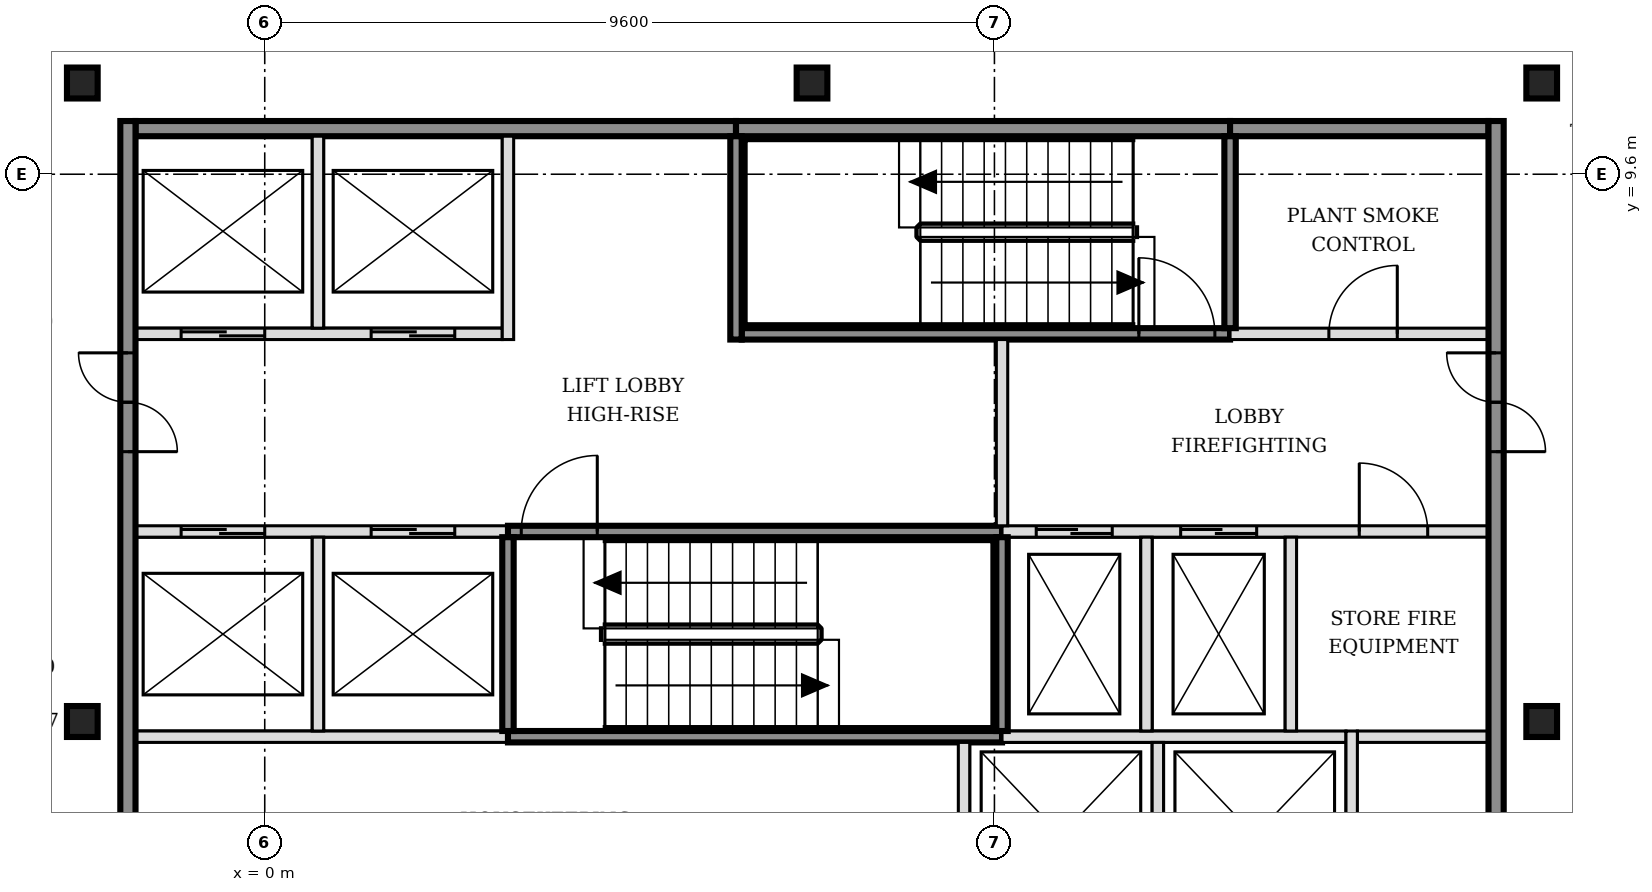
"""IFC4 building model, lengths in metres.
Left out: names, types, materials, properties, quantities, classifications, styles, units other than length and angle.
Written with IfcOpenShell. Run it as: python <this file> out.ifc"""

import sys

from ifc_helpers import new_model, si_unit, direction, frame, frame_2d, origin, origin_2d, place, context, subcontext, project, spatial, rectangle, i_section, extrude, element, fill, save


model = new_model("IFC4")
c1 = context("Model", 3, precision=1e-05, world=origin(), true_north=direction((0.0, 1.0)))
c2 = subcontext(c1, "Body", "Model", "MODEL_VIEW")
j1 = project(units=[si_unit("LENGTHUNIT", "METRE"), si_unit("PLANEANGLEUNIT", "RADIAN")], contexts=[c1])
p1 = place(None, origin())
s1 = spatial("IfcSite", under=j1, at=p1, CompositionType="ELEMENT")
p2 = place(p1, origin())
s2 = spatial("IfcBuilding", under=s1, at=p2, CompositionType="ELEMENT")
p3 = place(p2, frame((0.0, 0.0, 221.4)))
s3 = spatial("IfcBuildingStorey", under=s2, at=p3, CompositionType="ELEMENT", Elevation=221.4)
for number, where, z_axis, x_axis in (
    (1, (-2.4, 2.4, -0.15), (0.0, 0.0, 1.0), (1.0, 0.0, 0.0)),
    (2, (16.8, 2.4, -0.15), (0.0, 0.0, 1.0), (1.0, 0.0, 0.0)),
    (3, (-2.4, 10.8, -0.15), (0.0, 0.0, 1.0), (1.0, 0.0, 0.0)),
    (4, (7.2, 10.8, -0.15), (0.0, 0.0, 1.0), (1.0, 0.0, 0.0)),
    (5, (16.8, 10.8, -0.15), (0.0, 0.0, 1.0), (1.0, 0.0, 0.0)),
):
    element("IfcColumn", number, at=place(p3, frame(where, z_axis=z_axis, x_axis=x_axis)), inside=s3, PredefinedType="COLUMN", context=c2, shape_type="SweptSolid", body=[
        extrude(i_section(OverallWidth=0.404, OverallDepth=0.407, WebThickness=0.027, FlangeThickness=0.044, FilletRadius=0.015, at=origin_2d()), origin(), (0.0, 0.0, 1.0), 3.6),
    ])
p4 = place(p3, frame((-1.7, 2.2, 0.0), z_axis=(0.0, 0.0, 1.0), x_axis=(1.0, 0.0, 0.0)))
e6 = element("IfcWall", 6, at=p4, inside=s3, PredefinedType="SOLIDWALL", context=c2, shape_type="SweptSolid", body=[
    extrude(rectangle(XDim=4.9, YDim=0.15, at=frame_2d((2.45, 0.0))), origin(), (0.0, 0.0, 1.0), 3.45),
])
p5 = place(p3, frame((3.2, 2.2, 0.0), z_axis=(0.0, 0.0, 1.0), x_axis=(1.0, 0.0, 0.0)))
e7 = element("IfcWall", 7, at=p5, inside=s3, PredefinedType="SOLIDWALL", context=c2, shape_type="SweptSolid", body=[
    extrude(rectangle(XDim=6.5, YDim=0.15, at=frame_2d((3.25, 0.0))), origin(), (0.0, 0.0, 1.0), 3.45),
])
p6 = place(p3, frame((9.7, 2.2, 0.0), z_axis=(0.0, 0.0, 1.0), x_axis=(1.0, 0.0, 0.0)))
e8 = element("IfcWall", 8, at=p6, inside=s3, PredefinedType="SOLIDWALL", context=c2, shape_type="SweptSolid", body=[
    extrude(rectangle(XDim=4.525, YDim=0.15, at=frame_2d((2.263, 0.0))), origin(), (0.0, 0.0, 1.0), 3.45),
])
p7 = place(p3, frame((14.375, 2.2, 0.0), z_axis=(0.0, 0.0, 1.0), x_axis=(1.0, 0.0, 0.0)))
e9 = element("IfcWall", 9, at=p7, inside=s3, PredefinedType="PARTITIONING", context=c2, shape_type="SweptSolid", body=[
    extrude(rectangle(XDim=1.725, YDim=0.15, at=frame_2d((0.863, 0.0))), origin(), (0.0, 0.0, 1.0), 3.45),
])
p8 = place(p3, frame((-1.7, 4.9, 0.0), z_axis=(0.0, 0.0, 1.0), x_axis=(1.0, 0.0, 0.0)))
e10 = element("IfcWall", 10, at=p8, inside=s3, PredefinedType="SOLIDWALL", context=c2, shape_type="SweptSolid", body=[
    extrude(rectangle(XDim=4.9, YDim=0.15, at=frame_2d((2.45, 0.0))), origin(), (0.0, 0.0, 1.0), 3.45),
])
p9 = place(p8, frame((0.6, 0.0, 0.0)))
e11 = element("IfcOpeningElement", 11, at=p9, cuts=e10, PredefinedType="OPENING", context=c2, shape_type="SweptSolid", body=[
    extrude(rectangle(XDim=1.1, YDim=2.1, at=frame_2d((0.55, 1.05))), frame((0.0, 0.085, 0.0), z_axis=(0.0, -1.0, 0.0), x_axis=(1.0, 0.0, 0.0)), (0.0, 0.0, 1.0), 0.17),
])
p10 = place(p8, frame((3.1, 0.0, 0.0)))
e12 = element("IfcOpeningElement", 12, at=p10, cuts=e10, PredefinedType="OPENING", context=c2, shape_type="SweptSolid", body=[
    extrude(rectangle(XDim=1.1, YDim=2.1, at=frame_2d((0.55, 1.05))), frame((0.0, 0.085, 0.0), z_axis=(0.0, -1.0, 0.0), x_axis=(1.0, 0.0, 0.0)), (0.0, 0.0, 1.0), 0.17),
])
p11 = place(p3, frame((3.2, 4.9, 0.0), z_axis=(0.0, 0.0, 1.0), x_axis=(1.0, 0.0, 0.0)))
e13 = element("IfcWall", 13, at=p11, inside=s3, PredefinedType="SOLIDWALL", context=c2, shape_type="SweptSolid", body=[
    extrude(rectangle(XDim=6.5, YDim=0.15, at=frame_2d((3.25, 0.0))), origin(), (0.0, 0.0, 1.0), 3.45),
])
p12 = place(p11, frame((0.175, 0.0, 0.0)))
e14 = element("IfcOpeningElement", 14, at=p12, cuts=e13, PredefinedType="OPENING", context=c2, shape_type="SweptSolid", body=[
    extrude(rectangle(XDim=1.0, YDim=2.1, at=frame_2d((0.5, 1.05))), frame((0.0, 0.085, 0.0), z_axis=(0.0, -1.0, 0.0), x_axis=(1.0, 0.0, 0.0)), (0.0, 0.0, 1.0), 0.17),
])
p13 = place(p3, frame((9.7, 4.9, 0.0), z_axis=(0.0, 0.0, 1.0), x_axis=(1.0, 0.0, 0.0)))
e15 = element("IfcWall", 15, at=p13, inside=s3, PredefinedType="SOLIDWALL", context=c2, shape_type="SweptSolid", body=[
    extrude(rectangle(XDim=6.4, YDim=0.15, at=frame_2d((3.2, 0.0))), origin(), (0.0, 0.0, 1.0), 3.45),
])
p14 = place(p13, frame((0.45, 0.0, 0.0)))
e16 = element("IfcOpeningElement", 16, at=p14, cuts=e15, PredefinedType="OPENING", context=c2, shape_type="SweptSolid", body=[
    extrude(rectangle(XDim=1.0, YDim=2.1, at=frame_2d((0.5, 1.05))), frame((0.0, 0.085, 0.0), z_axis=(0.0, -1.0, 0.0), x_axis=(1.0, 0.0, 0.0)), (0.0, 0.0, 1.0), 0.17),
])
p15 = place(p13, frame((2.35, 0.0, 0.0)))
e17 = element("IfcOpeningElement", 17, at=p15, cuts=e15, PredefinedType="OPENING", context=c2, shape_type="SweptSolid", body=[
    extrude(rectangle(XDim=1.0, YDim=2.1, at=frame_2d((0.5, 1.05))), frame((0.0, 0.085, 0.0), z_axis=(0.0, -1.0, 0.0), x_axis=(1.0, 0.0, 0.0)), (0.0, 0.0, 1.0), 0.17),
])
p16 = place(p13, frame((4.7, 0.0, 0.0)))
e18 = element("IfcOpeningElement", 18, at=p16, cuts=e15, PredefinedType="OPENING", context=c2, shape_type="SweptSolid", body=[
    extrude(rectangle(XDim=0.9, YDim=2.1, at=frame_2d((0.45, 1.05))), frame((0.0, 0.085, 0.0), z_axis=(0.0, -1.0, 0.0), x_axis=(1.0, 0.0, 0.0)), (0.0, 0.0, 1.0), 0.17),
])
p17 = place(p3, frame((-1.7, 7.5, 0.0), z_axis=(0.0, 0.0, 1.0), x_axis=(1.0, 0.0, 0.0)))
e19 = element("IfcWall", 19, at=p17, inside=s3, PredefinedType="SOLIDWALL", context=c2, shape_type="SweptSolid", body=[
    extrude(rectangle(XDim=4.825, YDim=0.15, at=frame_2d((2.413, 0.0))), origin(), (0.0, 0.0, 1.0), 3.45),
])
p18 = place(p17, frame((0.6, 0.0, 0.0)))
e20 = element("IfcOpeningElement", 20, at=p18, cuts=e19, PredefinedType="OPENING", context=c2, shape_type="SweptSolid", body=[
    extrude(rectangle(XDim=1.1, YDim=2.1, at=frame_2d((0.55, 1.05))), frame((0.0, 0.085, 0.0), z_axis=(0.0, -1.0, 0.0), x_axis=(1.0, 0.0, 0.0)), (0.0, 0.0, 1.0), 0.17),
])
p19 = place(p17, frame((3.1, 0.0, 0.0)))
e21 = element("IfcOpeningElement", 21, at=p19, cuts=e19, PredefinedType="OPENING", context=c2, shape_type="SweptSolid", body=[
    extrude(rectangle(XDim=1.1, YDim=2.1, at=frame_2d((0.55, 1.05))), frame((0.0, 0.085, 0.0), z_axis=(0.0, -1.0, 0.0), x_axis=(1.0, 0.0, 0.0)), (0.0, 0.0, 1.0), 0.17),
])
p20 = place(p3, frame((6.275, 7.5, 0.0), z_axis=(0.0, 0.0, 1.0), x_axis=(1.0, 0.0, 0.0)))
e22 = element("IfcWall", 22, at=p20, inside=s3, PredefinedType="SOLIDWALL", context=c2, shape_type="SweptSolid", body=[
    extrude(rectangle(XDim=6.425, YDim=0.15, at=frame_2d((3.212, 0.0))), origin(), (0.0, 0.0, 1.0), 3.45),
])
p21 = place(p20, frame((5.225, 0.0, 0.0)))
e23 = element("IfcOpeningElement", 23, at=p21, cuts=e22, PredefinedType="OPENING", context=c2, shape_type="SweptSolid", body=[
    extrude(rectangle(XDim=1.0, YDim=2.1, at=frame_2d((0.5, 1.05))), frame((0.0, 0.085, 0.0), z_axis=(0.0, -1.0, 0.0), x_axis=(1.0, 0.0, 0.0)), (0.0, 0.0, 1.0), 0.17),
])
p22 = place(p3, frame((12.7, 7.5, 0.0), z_axis=(0.0, 0.0, 1.0), x_axis=(1.0, 0.0, 0.0)))
e24 = element("IfcWall", 24, at=p22, inside=s3, PredefinedType="SOLIDWALL", context=c2, shape_type="SweptSolid", body=[
    extrude(rectangle(XDim=3.4, YDim=0.15, at=frame_2d((1.7, 0.0))), origin(), (0.0, 0.0, 1.0), 3.45),
])
p23 = place(p22, frame((1.3, 0.0, 0.0)))
e25 = element("IfcOpeningElement", 25, at=p23, cuts=e24, PredefinedType="OPENING", context=c2, shape_type="SweptSolid", body=[
    extrude(rectangle(XDim=0.9, YDim=2.1, at=frame_2d((0.45, 1.05))), frame((0.0, 0.085, 0.0), z_axis=(0.0, -1.0, 0.0), x_axis=(1.0, 0.0, 0.0)), (0.0, 0.0, 1.0), 0.17),
])
p24 = place(p3, frame((-1.7, 10.2, 0.0), z_axis=(0.0, 0.0, 1.0), x_axis=(1.0, 0.0, 0.0)))
e26 = element("IfcWall", 26, at=p24, inside=s3, PredefinedType="SOLIDWALL", context=c2, shape_type="SweptSolid", body=[
    extrude(rectangle(XDim=7.9, YDim=0.2, at=frame_2d((3.95, 0.0))), origin(), (0.0, 0.0, 1.0), 3.45),
])
p25 = place(p3, frame((6.2, 10.2, 0.0), z_axis=(0.0, 0.0, 1.0), x_axis=(1.0, 0.0, 0.0)))
e27 = element("IfcWall", 27, at=p25, inside=s3, PredefinedType="SOLIDWALL", context=c2, shape_type="SweptSolid", body=[
    extrude(rectangle(XDim=6.5, YDim=0.2, at=frame_2d((3.25, 0.0))), origin(), (0.0, 0.0, 1.0), 3.45),
])
p26 = place(p3, frame((12.7, 10.2, 0.0), z_axis=(0.0, 0.0, 1.0), x_axis=(1.0, 0.0, 0.0)))
e28 = element("IfcWall", 28, at=p26, inside=s3, PredefinedType="SOLIDWALL", context=c2, shape_type="SweptSolid", body=[
    extrude(rectangle(XDim=3.4, YDim=0.2, at=frame_2d((1.7, 0.0))), origin(), (0.0, 0.0, 1.0), 3.45),
])
p27 = place(p3, frame((-1.8, -5.5, 0.0), z_axis=(0.0, 0.0, 1.0), x_axis=(0.0, 1.0, 0.0)))
e29 = element("IfcWall", 29, at=p27, inside=s3, PredefinedType="SOLIDWALL", context=c2, shape_type="SweptSolid", body=[
    extrude(rectangle(XDim=15.8, YDim=0.2, at=frame_2d((7.9, 0.0))), origin(), (0.0, 0.0, 1.0), 3.45),
])
p28 = place(p27, frame((3.05, 0.0, 0.0)))
e30 = element("IfcOpeningElement", 30, at=p28, cuts=e29, PredefinedType="OPENING", context=c2, shape_type="SweptSolid", body=[
    extrude(rectangle(XDim=1.3, YDim=2.1, at=frame_2d((0.65, 1.05))), frame((0.0, 0.11, 0.0), z_axis=(0.0, -1.0, 0.0), x_axis=(1.0, 0.0, 0.0)), (0.0, 0.0, 1.0), 0.22),
])
p29 = place(p27, frame((11.45, 0.0, 0.0)))
e31 = element("IfcOpeningElement", 31, at=p29, cuts=e29, PredefinedType="OPENING", context=c2, shape_type="SweptSolid", body=[
    extrude(rectangle(XDim=1.3, YDim=2.1, at=frame_2d((0.65, 1.05))), frame((0.0, 0.11, 0.0), z_axis=(0.0, -1.0, 0.0), x_axis=(1.0, 0.0, 0.0)), (0.0, 0.0, 1.0), 0.22),
])
p30 = place(p3, frame((0.7, 2.275, 0.0), z_axis=(0.0, 0.0, 1.0), x_axis=(0.0, 1.0, 0.0)))
e32 = element("IfcWall", 32, at=p30, inside=s3, PredefinedType="SOLIDWALL", context=c2, shape_type="SweptSolid", body=[
    extrude(rectangle(XDim=2.55, YDim=0.15, at=frame_2d((1.275, 0.0))), origin(), (0.0, 0.0, 1.0), 3.45),
])
p31 = place(p3, frame((0.7, 7.575, 0.0), z_axis=(0.0, 0.0, 1.0), x_axis=(0.0, 1.0, 0.0)))
e33 = element("IfcWall", 33, at=p31, inside=s3, PredefinedType="SOLIDWALL", context=c2, shape_type="SweptSolid", body=[
    extrude(rectangle(XDim=2.525, YDim=0.15, at=frame_2d((1.263, 0.0))), origin(), (0.0, 0.0, 1.0), 3.45),
])
p32 = place(p3, frame((3.2, 2.275, 0.0), z_axis=(0.0, 0.0, 1.0), x_axis=(0.0, 1.0, 0.0)))
e34 = element("IfcWall", 34, at=p32, inside=s3, PredefinedType="SOLIDWALL", context=c2, shape_type="SweptSolid", body=[
    extrude(rectangle(XDim=2.55, YDim=0.15, at=frame_2d((1.275, 0.0))), origin(), (0.0, 0.0, 1.0), 3.45),
])
for number, where, z_axis, x_axis in (
    (35, (3.2, 7.425, 0.0), (0.0, 0.0, 1.0), (0.0, 1.0, 0.0)),
    (36, (6.2, 7.425, 0.0), (0.0, 0.0, 1.0), (0.0, 1.0, 0.0)),
):
    element("IfcWall", number, at=place(p3, frame(where, z_axis=z_axis, x_axis=x_axis)), inside=s3, PredefinedType="SOLIDWALL", context=c2, shape_type="SweptSolid", body=[
        extrude(rectangle(XDim=2.675, YDim=0.15, at=frame_2d((1.337, 0.0))), origin(), (0.0, 0.0, 1.0), 3.45),
    ])
p33 = place(p3, frame((9.2, -0.475, 0.0), z_axis=(0.0, 0.0, 1.0), x_axis=(0.0, 1.0, 0.0)))
e37 = element("IfcWall", 37, at=p33, inside=s3, PredefinedType="SOLIDWALL", context=c2, shape_type="SweptSolid", body=[
    extrude(rectangle(XDim=2.6, YDim=0.15, at=frame_2d((1.3, 0.0))), origin(), (0.0, 0.0, 1.0), 3.45),
])
p34 = place(p3, frame((9.7, 2.275, 0.0), z_axis=(0.0, 0.0, 1.0), x_axis=(0.0, 1.0, 0.0)))
e38 = element("IfcWall", 38, at=p34, inside=s3, PredefinedType="SOLIDWALL", context=c2, shape_type="SweptSolid", body=[
    extrude(rectangle(XDim=2.55, YDim=0.15, at=frame_2d((1.275, 0.0))), origin(), (0.0, 0.0, 1.0), 3.45),
])
p35 = place(p3, frame((9.7, 4.975, 0.0), z_axis=(0.0, 0.0, 1.0), x_axis=(0.0, 1.0, 0.0)))
e39 = element("IfcWall", 39, at=p35, inside=s3, PredefinedType="SOLIDWALL", context=c2, shape_type="SweptSolid", body=[
    extrude(rectangle(XDim=2.45, YDim=0.15, at=frame_2d((1.225, 0.0))), origin(), (0.0, 0.0, 1.0), 3.45),
])
p36 = place(p3, frame((11.6, 2.275, 0.0), z_axis=(0.0, 0.0, 1.0), x_axis=(0.0, 1.0, 0.0)))
e40 = element("IfcWall", 40, at=p36, inside=s3, PredefinedType="SOLIDWALL", context=c2, shape_type="SweptSolid", body=[
    extrude(rectangle(XDim=2.55, YDim=0.15, at=frame_2d((1.275, 0.0))), origin(), (0.0, 0.0, 1.0), 3.45),
])
p37 = place(p3, frame((11.75, -0.325, 0.0), z_axis=(0.0, 0.0, 1.0), x_axis=(0.0, 1.0, 0.0)))
e41 = element("IfcWall", 41, at=p37, inside=s3, PredefinedType="SOLIDWALL", context=c2, shape_type="SweptSolid", body=[
    extrude(rectangle(XDim=2.45, YDim=0.15, at=frame_2d((1.225, 0.0))), origin(), (0.0, 0.0, 1.0), 3.45),
])
p38 = place(p3, frame((12.7, 7.575, 0.0), z_axis=(0.0, 0.0, 1.0), x_axis=(0.0, 1.0, 0.0)))
e42 = element("IfcWall", 42, at=p38, inside=s3, PredefinedType="SOLIDWALL", context=c2, shape_type="SweptSolid", body=[
    extrude(rectangle(XDim=2.525, YDim=0.15, at=frame_2d((1.263, 0.0))), origin(), (0.0, 0.0, 1.0), 3.45),
])
p39 = place(p3, frame((13.5, 2.275, 0.0), z_axis=(0.0, 0.0, 1.0), x_axis=(0.0, 1.0, 0.0)))
e43 = element("IfcWall", 43, at=p39, inside=s3, PredefinedType="SOLIDWALL", context=c2, shape_type="SweptSolid", body=[
    extrude(rectangle(XDim=2.55, YDim=0.15, at=frame_2d((1.275, 0.0))), origin(), (0.0, 0.0, 1.0), 3.45),
])
p40 = place(p3, frame((14.3, -0.475, 0.0), z_axis=(0.0, 0.0, 1.0), x_axis=(0.0, 1.0, 0.0)))
e44 = element("IfcWall", 44, at=p40, inside=s3, PredefinedType="SOLIDWALL", context=c2, shape_type="SweptSolid", body=[
    extrude(rectangle(XDim=2.75, YDim=0.15, at=frame_2d((1.375, 0.0))), origin(), (0.0, 0.0, 1.0), 3.45),
])
p41 = place(p3, frame((16.2, -5.5, 0.0), z_axis=(0.0, 0.0, 1.0), x_axis=(0.0, 1.0, 0.0)))
e45 = element("IfcWall", 45, at=p41, inside=s3, PredefinedType="SOLIDWALL", context=c2, shape_type="SweptSolid", body=[
    extrude(rectangle(XDim=15.8, YDim=0.2, at=frame_2d((7.9, 0.0))), origin(), (0.0, 0.0, 1.0), 3.45),
])
p42 = place(p41, frame((3.05, 0.0, 0.0)))
e46 = element("IfcOpeningElement", 46, at=p42, cuts=e45, PredefinedType="OPENING", context=c2, shape_type="SweptSolid", body=[
    extrude(rectangle(XDim=1.3, YDim=2.1, at=frame_2d((0.65, 1.05))), frame((0.0, 0.11, 0.0), z_axis=(0.0, -1.0, 0.0), x_axis=(1.0, 0.0, 0.0)), (0.0, 0.0, 1.0), 0.22),
])
p43 = place(p41, frame((11.45, 0.0, 0.0)))
e47 = element("IfcOpeningElement", 47, at=p43, cuts=e45, PredefinedType="OPENING", context=c2, shape_type="SweptSolid", body=[
    extrude(rectangle(XDim=1.3, YDim=2.1, at=frame_2d((0.65, 1.05))), frame((0.0, 0.11, 0.0), z_axis=(0.0, -1.0, 0.0), x_axis=(1.0, 0.0, 0.0)), (0.0, 0.0, 1.0), 0.22),
])
p44 = place(p9, origin())
e48 = element("IfcDoor", 48, at=p44, inside=s3, OperationType="DOUBLE_DOOR_SLIDING", PredefinedType="DOOR", context=c2, shape_type="SweptSolid", body=[
    extrude(rectangle(XDim=1.1, YDim=2.1, at=frame_2d((0.55, 1.05))), frame((0.0, 0.025, 0.0), z_axis=(0.0, -1.0, 0.0), x_axis=(1.0, 0.0, 0.0)), (0.0, 0.0, 1.0), 0.05),
])
fill(e11, e48)
p45 = place(p10, origin())
e49 = element("IfcDoor", 49, at=p45, inside=s3, OperationType="DOUBLE_DOOR_SLIDING", PredefinedType="DOOR", context=c2, shape_type="SweptSolid", body=[
    extrude(rectangle(XDim=1.1, YDim=2.1, at=frame_2d((0.55, 1.05))), frame((0.0, 0.025, 0.0), z_axis=(0.0, -1.0, 0.0), x_axis=(1.0, 0.0, 0.0)), (0.0, 0.0, 1.0), 0.05),
])
fill(e12, e49)
p46 = place(p18, origin())
e50 = element("IfcDoor", 50, at=p46, inside=s3, OperationType="DOUBLE_DOOR_SLIDING", PredefinedType="DOOR", context=c2, shape_type="SweptSolid", body=[
    extrude(rectangle(XDim=1.1, YDim=2.1, at=frame_2d((0.55, 1.05))), frame((0.0, 0.025, 0.0), z_axis=(0.0, -1.0, 0.0), x_axis=(1.0, 0.0, 0.0)), (0.0, 0.0, 1.0), 0.05),
])
fill(e20, e50)
p47 = place(p19, origin())
e51 = element("IfcDoor", 51, at=p47, inside=s3, OperationType="DOUBLE_DOOR_SLIDING", PredefinedType="DOOR", context=c2, shape_type="SweptSolid", body=[
    extrude(rectangle(XDim=1.1, YDim=2.1, at=frame_2d((0.55, 1.05))), frame((0.0, 0.025, 0.0), z_axis=(0.0, -1.0, 0.0), x_axis=(1.0, 0.0, 0.0)), (0.0, 0.0, 1.0), 0.05),
])
fill(e21, e51)
p48 = place(p14, origin())
e52 = element("IfcDoor", 52, at=p48, inside=s3, OperationType="DOUBLE_DOOR_SLIDING", PredefinedType="DOOR", context=c2, shape_type="SweptSolid", body=[
    extrude(rectangle(XDim=1.0, YDim=2.1, at=frame_2d((0.5, 1.05))), frame((0.0, 0.025, 0.0), z_axis=(0.0, -1.0, 0.0), x_axis=(1.0, 0.0, 0.0)), (0.0, 0.0, 1.0), 0.05),
])
fill(e16, e52)
p49 = place(p15, origin())
e53 = element("IfcDoor", 53, at=p49, inside=s3, OperationType="DOUBLE_DOOR_SLIDING", PredefinedType="DOOR", context=c2, shape_type="SweptSolid", body=[
    extrude(rectangle(XDim=1.0, YDim=2.1, at=frame_2d((0.5, 1.05))), frame((0.0, 0.025, 0.0), z_axis=(0.0, -1.0, 0.0), x_axis=(1.0, 0.0, 0.0)), (0.0, 0.0, 1.0), 0.05),
])
fill(e17, e53)
p50 = place(p12, origin())
e54 = element("IfcDoor", 54, at=p50, inside=s3, OperationType="SINGLE_SWING_RIGHT", PredefinedType="DOOR", context=c2, shape_type="SweptSolid", body=[
    extrude(rectangle(XDim=1.0, YDim=2.1, at=frame_2d((0.5, 1.05))), frame((0.0, 0.025, 0.0), z_axis=(0.0, -1.0, 0.0), x_axis=(1.0, 0.0, 0.0)), (0.0, 0.0, 1.0), 0.05),
])
fill(e14, e54)
p51 = place(p21, origin())
e55 = element("IfcDoor", 55, at=p51, inside=s3, OperationType="SINGLE_SWING_LEFT", PredefinedType="DOOR", context=c2, shape_type="SweptSolid", body=[
    extrude(rectangle(XDim=1.0, YDim=2.1, at=frame_2d((0.5, 1.05))), frame((0.0, 0.025, 0.0), z_axis=(0.0, -1.0, 0.0), x_axis=(1.0, 0.0, 0.0)), (0.0, 0.0, 1.0), 0.05),
])
fill(e23, e55)
p52 = place(p29, origin())
e56 = element("IfcDoor", 56, at=p52, inside=s3, OperationType="DOUBLE_DOOR_SINGLE_SWING", PredefinedType="DOOR", context=c2, shape_type="SweptSolid", body=[
    extrude(rectangle(XDim=1.3, YDim=2.1, at=frame_2d((0.65, 1.05))), frame((0.0, 0.025, 0.0), z_axis=(0.0, -1.0, 0.0), x_axis=(1.0, 0.0, 0.0)), (0.0, 0.0, 1.0), 0.05),
])
fill(e31, e56)
p53 = place(p43, origin())
e57 = element("IfcDoor", 57, at=p53, inside=s3, OperationType="DOUBLE_DOOR_SINGLE_SWING", PredefinedType="DOOR", context=c2, shape_type="SweptSolid", body=[
    extrude(rectangle(XDim=1.3, YDim=2.1, at=frame_2d((0.65, 1.05))), frame((0.0, 0.025, 0.0), z_axis=(0.0, -1.0, 0.0), x_axis=(1.0, 0.0, 0.0)), (0.0, 0.0, 1.0), 0.05),
])
fill(e47, e57)
p54 = place(p16, origin())
e58 = element("IfcDoor", 58, at=p54, inside=s3, OperationType="SINGLE_SWING_LEFT", PredefinedType="DOOR", context=c2, shape_type="SweptSolid", body=[
    extrude(rectangle(XDim=0.9, YDim=2.1, at=frame_2d((0.45, 1.05))), frame((0.0, 0.025, 0.0), z_axis=(0.0, -1.0, 0.0), x_axis=(1.0, 0.0, 0.0)), (0.0, 0.0, 1.0), 0.05),
])
fill(e18, e58)
p55 = place(p23, origin())
e59 = element("IfcDoor", 59, at=p55, inside=s3, OperationType="SINGLE_SWING_RIGHT", PredefinedType="DOOR", context=c2, shape_type="SweptSolid", body=[
    extrude(rectangle(XDim=0.9, YDim=2.1, at=frame_2d((0.45, 1.05))), frame((0.0, 0.025, 0.0), z_axis=(0.0, -1.0, 0.0), x_axis=(1.0, 0.0, 0.0)), (0.0, 0.0, 1.0), 0.05),
])
fill(e25, e59)
save(model, sys.argv[1])
